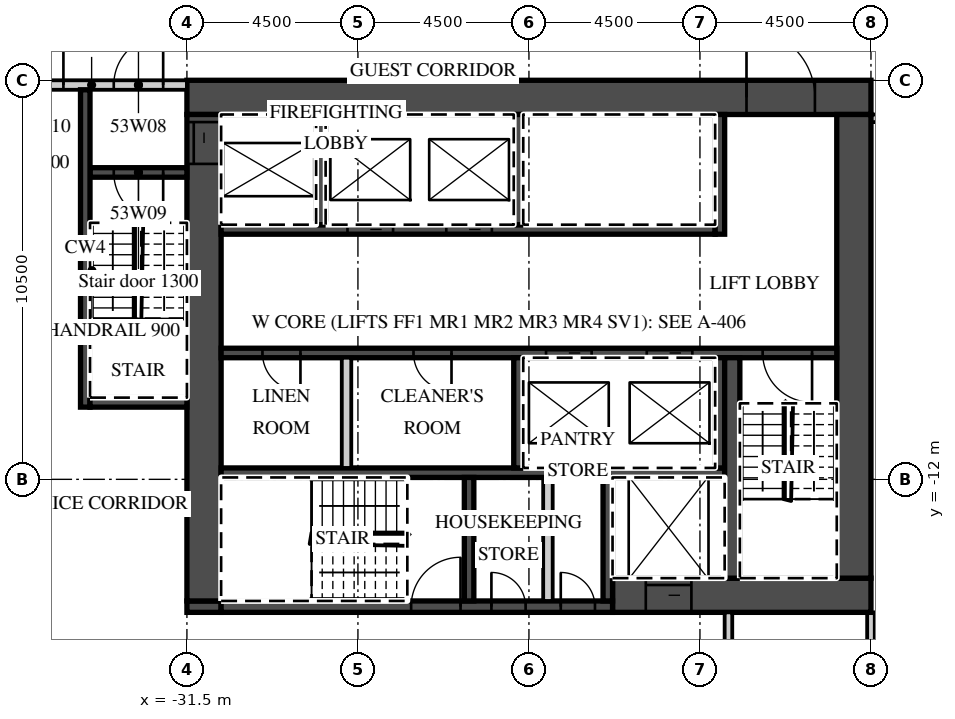
"""IFC4 building model, lengths in metres.
Left out: names, types, materials, properties, quantities, classifications, styles, units other than length and angle.
Written with IfcOpenShell. Run it as: python <this file> out.ifc"""

import sys

from ifc_helpers import new_model, si_unit, direction, frame, frame_2d, origin, place, context, subcontext, project, spatial, rectangle, extrude, element, fill, save


model = new_model("IFC4")
c1 = context("Model", 3, precision=1e-05, world=origin(), true_north=direction((0.0, 1.0)))
c2 = subcontext(c1, "Body", "Model", "MODEL_VIEW")
j1 = project(units=[si_unit("LENGTHUNIT", "METRE"), si_unit("PLANEANGLEUNIT", "RADIAN")], contexts=[c1])
p1 = place(None, origin())
s1 = spatial("IfcSite", under=j1, at=p1, CompositionType="ELEMENT")
p2 = place(p1, origin())
s2 = spatial("IfcBuilding", under=s1, at=p2, CompositionType="ELEMENT")
p3 = place(p2, frame((0.0, 0.0, 221.0)))
s3 = spatial("IfcBuildingStorey", under=s2, at=p3, CompositionType="ELEMENT", Elevation=221.0)
p4 = place(p3, frame((-13.5, -19.641, 0.0), z_axis=(0.0, 0.0, 1.0), x_axis=(0.0, 1.0, 0.0)))
e1 = element("IfcWall", 1, at=p4, inside=s3, PredefinedType="PARTITIONING", context=c2, shape_type="SweptSolid", body=[
    extrude(rectangle(XDim=4.141, YDim=0.2, at=frame_2d((2.071, 0.0))), origin(), (0.0, 0.0, 1.0), 3.02),
])
p5 = place(p3, frame((-13.5, -2.5, 0.0), z_axis=(0.0, 0.0, 1.0), x_axis=(1.0, 0.0, 0.0)))
e2 = element("IfcWall", 2, at=p5, inside=s3, PredefinedType="PARTITIONING", context=c2, shape_type="SweptSolid", body=[
    extrude(rectangle(XDim=27.0, YDim=0.2, at=frame_2d((13.5, 0.0))), origin(), (0.0, 0.0, 1.0), 3.02),
])
p6 = place(p5, frame((0.575, 0.0, 0.0)))
e3 = element("IfcOpeningElement", 3, at=p6, cuts=e2, PredefinedType="OPENING", context=c2, shape_type="SweptSolid", body=[
    extrude(rectangle(XDim=1.0, YDim=2.1, at=frame_2d((0.5, 1.05))), frame((0.0, 0.11, 0.0), z_axis=(0.0, -1.0, 0.0), x_axis=(1.0, 0.0, 0.0)), (0.0, 0.0, 1.0), 0.22),
])
p7 = place(p5, frame((6.938, 0.0, 0.0)))
e4 = element("IfcOpeningElement", 4, at=p7, cuts=e2, PredefinedType="OPENING", context=c2, shape_type="SweptSolid", body=[
    extrude(rectangle(XDim=1.2, YDim=2.1, at=frame_2d((0.6, 1.05))), frame((0.0, 0.11, 0.0), z_axis=(0.0, -1.0, 0.0), x_axis=(1.0, 0.0, 0.0)), (0.0, 0.0, 1.0), 0.22),
])
p8 = place(p5, frame((15.938, 0.0, 0.0)))
e5 = element("IfcOpeningElement", 5, at=p8, cuts=e2, PredefinedType="OPENING", context=c2, shape_type="SweptSolid", body=[
    extrude(rectangle(XDim=1.2, YDim=2.1, at=frame_2d((0.6, 1.05))), frame((0.0, 0.11, 0.0), z_axis=(0.0, -1.0, 0.0), x_axis=(1.0, 0.0, 0.0)), (0.0, 0.0, 1.0), 0.22),
])
p9 = place(p5, frame((25.425, 0.0, 0.0)))
e6 = element("IfcOpeningElement", 6, at=p9, cuts=e2, PredefinedType="OPENING", context=c2, shape_type="SweptSolid", body=[
    extrude(rectangle(XDim=1.0, YDim=2.1, at=frame_2d((0.5, 1.05))), frame((0.0, 0.11, 0.0), z_axis=(0.0, -1.0, 0.0), x_axis=(1.0, 0.0, 0.0)), (0.0, 0.0, 1.0), 0.22),
])
p10 = place(p3, frame((-31.5, -1.95, 0.0), z_axis=(0.0, 0.0, 1.0), x_axis=(1.0, 0.0, 0.0)))
e7 = element("IfcWall", 7, at=p10, inside=s3, PredefinedType="SHEAR", context=c2, shape_type="SweptSolid", body=[
    extrude(rectangle(XDim=18.0, YDim=0.9, at=frame_2d((9.0, 0.0))), origin(), (0.0, 0.0, 1.0), 3.02),
])
p11 = place(p10, frame((14.725, 0.0, 0.0)))
e8 = element("IfcOpeningElement", 8, at=p11, cuts=e7, PredefinedType="OPENING", context=c2, shape_type="SweptSolid", body=[
    extrude(rectangle(XDim=1.8, YDim=2.1, at=frame_2d((0.9, 1.05))), frame((0.0, 0.46, 0.0), z_axis=(0.0, -1.0, 0.0), x_axis=(1.0, 0.0, 0.0)), (0.0, 0.0, 1.0), 0.92),
])
p12 = place(p3, frame((-20.3, -15.05, 0.0), z_axis=(0.0, 0.0, 1.0), x_axis=(1.0, 0.0, 0.0)))
e9 = element("IfcWall", 9, at=p12, inside=s3, PredefinedType="SHEAR", context=c2, shape_type="SweptSolid", body=[
    extrude(rectangle(XDim=6.8, YDim=0.9, at=frame_2d((3.4, 0.0))), origin(), (0.0, 0.0, 1.0), 3.02),
])
p13 = place(p12, frame((0.875, 0.0, 0.0)))
e10 = element("IfcOpeningElement", 10, at=p13, cuts=e9, PredefinedType="OPENING", context=c2, shape_type="SweptSolid", body=[
    extrude(rectangle(XDim=1.2, YDim=2.1, at=frame_2d((0.6, 1.05))), frame((0.0, 0.46, 0.0), z_axis=(0.0, -1.0, 0.0), x_axis=(1.0, 0.0, 0.0)), (0.0, 0.0, 1.0), 0.92),
])
p14 = place(p3, frame((-31.5, -15.35, 0.0), z_axis=(0.0, 0.0, 1.0), x_axis=(1.0, 0.0, 0.0)))
e11 = element("IfcWall", 11, at=p14, inside=s3, PredefinedType="SHEAR", context=c2, shape_type="SweptSolid", body=[
    extrude(rectangle(XDim=0.9, YDim=0.3, at=frame_2d((0.45, 0.0))), origin(), (0.0, 0.0, 1.0), 3.02),
])
p15 = place(p3, frame((-30.6, -15.35, 0.0), z_axis=(0.0, 0.0, 1.0), x_axis=(1.0, 0.0, 0.0)))
e12 = element("IfcWall", 12, at=p15, inside=s3, PredefinedType="SHEAR", context=c2, shape_type="SweptSolid", body=[
    extrude(rectangle(XDim=10.3, YDim=0.3, at=frame_2d((5.15, 0.0))), origin(), (0.0, 0.0, 1.0), 3.02),
])
p16 = place(p15, frame((5.0, 0.0, 0.0)))
e13 = element("IfcOpeningElement", 13, at=p16, cuts=e12, PredefinedType="OPENING", context=c2, shape_type="SweptSolid", body=[
    extrude(rectangle(XDim=1.3, YDim=2.1, at=frame_2d((0.65, 1.05))), frame((0.0, 0.16, 0.0), z_axis=(0.0, -1.0, 0.0), x_axis=(1.0, 0.0, 0.0)), (0.0, 0.0, 1.0), 0.32),
])
p17 = place(p15, frame((7.113, 0.0, 0.0)))
e14 = element("IfcOpeningElement", 14, at=p17, cuts=e12, PredefinedType="OPENING", context=c2, shape_type="SweptSolid", body=[
    extrude(rectangle(XDim=0.9, YDim=2.1, at=frame_2d((0.45, 1.05))), frame((0.0, 0.16, 0.0), z_axis=(0.0, -1.0, 0.0), x_axis=(1.0, 0.0, 0.0)), (0.0, 0.0, 1.0), 0.32),
])
p18 = place(p15, frame((8.938, 0.0, 0.0)))
e15 = element("IfcOpeningElement", 15, at=p18, cuts=e12, PredefinedType="OPENING", context=c2, shape_type="SweptSolid", body=[
    extrude(rectangle(XDim=0.9, YDim=2.1, at=frame_2d((0.45, 1.05))), frame((0.0, 0.16, 0.0), z_axis=(0.0, -1.0, 0.0), x_axis=(1.0, 0.0, 0.0)), (0.0, 0.0, 1.0), 0.32),
])
p19 = place(p3, frame((-31.05, -15.2, 0.0), z_axis=(0.0, 0.0, 1.0), x_axis=(0.0, 1.0, 0.0)))
e16 = element("IfcWall", 16, at=p19, inside=s3, PredefinedType="SHEAR", context=c2, shape_type="SweptSolid", body=[
    extrude(rectangle(XDim=12.8, YDim=0.9, at=frame_2d((6.4, 0.0))), origin(), (0.0, 0.0, 1.0), 3.02),
])
p20 = place(p19, frame((11.5, 0.0, 0.0)))
e17 = element("IfcOpeningElement", 17, at=p20, cuts=e16, PredefinedType="OPENING", context=c2, shape_type="SweptSolid", body=[
    extrude(rectangle(XDim=1.1, YDim=2.1, at=frame_2d((0.55, 1.05))), frame((0.0, 0.46, 0.0), z_axis=(0.0, -1.0, 0.0), x_axis=(1.0, 0.0, 0.0)), (0.0, 0.0, 1.0), 0.92),
])
p21 = place(p3, frame((-13.95, -14.6, 0.0), z_axis=(0.0, 0.0, 1.0), x_axis=(0.0, 1.0, 0.0)))
e18 = element("IfcWall", 18, at=p21, inside=s3, PredefinedType="SHEAR", context=c2, shape_type="SweptSolid", body=[
    extrude(rectangle(XDim=12.2, YDim=0.9, at=frame_2d((6.1, 0.0))), origin(), (0.0, 0.0, 1.0), 3.02),
])
p22 = place(p3, frame((-30.6, -5.425, 0.0), z_axis=(0.0, 0.0, 1.0), x_axis=(1.0, 0.0, 0.0)))
e19 = element("IfcWall", 19, at=p22, inside=s3, PredefinedType="SHEAR", context=c2, shape_type="SweptSolid", body=[
    extrude(rectangle(XDim=13.0, YDim=0.25, at=frame_2d((6.5, 0.0))), origin(), (0.0, 0.0, 1.0), 3.02),
])
p23 = place(p22, frame((3.325, 0.0, 0.0)))
e20 = element("IfcOpeningElement", 20, at=p23, cuts=e19, PredefinedType="OPENING", context=c2, shape_type="SweptSolid", body=[
    extrude(rectangle(XDim=1.2, YDim=2.1, at=frame_2d((0.6, 1.05))), frame((0.0, 0.135, 0.0), z_axis=(0.0, -1.0, 0.0), x_axis=(1.0, 0.0, 0.0)), (0.0, 0.0, 1.0), 0.27),
])
p24 = place(p22, frame((5.925, 0.0, 0.0)))
e21 = element("IfcOpeningElement", 21, at=p24, cuts=e19, PredefinedType="OPENING", context=c2, shape_type="SweptSolid", body=[
    extrude(rectangle(XDim=1.2, YDim=2.1, at=frame_2d((0.6, 1.05))), frame((0.0, 0.135, 0.0), z_axis=(0.0, -1.0, 0.0), x_axis=(1.0, 0.0, 0.0)), (0.0, 0.0, 1.0), 0.27),
])
p25 = place(p3, frame((-17.475, -5.55, 0.0), z_axis=(0.0, 0.0, 1.0), x_axis=(0.0, 1.0, 0.0)))
e22 = element("IfcWall", 22, at=p25, inside=s3, PredefinedType="SHEAR", context=c2, shape_type="SweptSolid", body=[
    extrude(rectangle(XDim=3.15, YDim=0.25, at=frame_2d((1.575, 0.0))), origin(), (0.0, 0.0, 1.0), 3.02),
])
for number, where, z_axis, x_axis in (
    (23, (-27.975, -5.3, 0.0), (0.0, 0.0, 1.0), (0.0, 1.0, 0.0)),
    (24, (-22.775, -5.3, 0.0), (0.0, 0.0, 1.0), (0.0, 1.0, 0.0)),
):
    element("IfcWall", number, at=place(p3, frame(where, z_axis=z_axis, x_axis=x_axis)), inside=s3, PredefinedType="SHEAR", context=c2, shape_type="SweptSolid", body=[
        extrude(rectangle(XDim=2.9, YDim=0.25, at=frame_2d((1.45, 0.0))), origin(), (0.0, 0.0, 1.0), 3.02),
    ])
p26 = place(p3, frame((-30.6, -8.675, 0.0), z_axis=(0.0, 0.0, 1.0), x_axis=(1.0, 0.0, 0.0)))
e25 = element("IfcWall", 25, at=p26, inside=s3, PredefinedType="SHEAR", context=c2, shape_type="SweptSolid", body=[
    extrude(rectangle(XDim=16.2, YDim=0.25, at=frame_2d((8.1, 0.0))), origin(), (0.0, 0.0, 1.0), 3.02),
])
p27 = place(p26, frame((8.55, 0.0, 0.0)))
e26 = element("IfcOpeningElement", 26, at=p27, cuts=e25, PredefinedType="OPENING", context=c2, shape_type="SweptSolid", body=[
    extrude(rectangle(XDim=1.2, YDim=2.1, at=frame_2d((0.6, 1.05))), frame((0.0, 0.135, 0.0), z_axis=(0.0, -1.0, 0.0), x_axis=(1.0, 0.0, 0.0)), (0.0, 0.0, 1.0), 0.27),
])
p28 = place(p26, frame((11.2, 0.0, 0.0)))
e27 = element("IfcOpeningElement", 27, at=p28, cuts=e25, PredefinedType="OPENING", context=c2, shape_type="SweptSolid", body=[
    extrude(rectangle(XDim=1.2, YDim=2.1, at=frame_2d((0.6, 1.05))), frame((0.0, 0.135, 0.0), z_axis=(0.0, -1.0, 0.0), x_axis=(1.0, 0.0, 0.0)), (0.0, 0.0, 1.0), 0.27),
])
p29 = place(p26, frame((14.25, 0.0, 0.0)))
e28 = element("IfcOpeningElement", 28, at=p29, cuts=e25, PredefinedType="OPENING", context=c2, shape_type="SweptSolid", body=[
    extrude(rectangle(XDim=1.3, YDim=2.1, at=frame_2d((0.65, 1.05))), frame((0.0, 0.135, 0.0), z_axis=(0.0, -1.0, 0.0), x_axis=(1.0, 0.0, 0.0)), (0.0, 0.0, 1.0), 0.27),
])
p30 = place(p26, frame((1.087, 0.0, 0.0)))
e29 = element("IfcOpeningElement", 29, at=p30, cuts=e25, PredefinedType="OPENING", context=c2, shape_type="SweptSolid", body=[
    extrude(rectangle(XDim=1.0, YDim=2.1, at=frame_2d((0.5, 1.05))), frame((0.0, 0.135, 0.0), z_axis=(0.0, -1.0, 0.0), x_axis=(1.0, 0.0, 0.0)), (0.0, 0.0, 1.0), 0.27),
])
p31 = place(p26, frame((5.062, 0.0, 0.0)))
e30 = element("IfcOpeningElement", 30, at=p31, cuts=e25, PredefinedType="OPENING", context=c2, shape_type="SweptSolid", body=[
    extrude(rectangle(XDim=1.0, YDim=2.1, at=frame_2d((0.5, 1.05))), frame((0.0, 0.135, 0.0), z_axis=(0.0, -1.0, 0.0), x_axis=(1.0, 0.0, 0.0)), (0.0, 0.0, 1.0), 0.27),
])
p32 = place(p3, frame((-30.6, -11.825, 0.0), z_axis=(0.0, 0.0, 1.0), x_axis=(1.0, 0.0, 0.0)))
e31 = element("IfcWall", 31, at=p32, inside=s3, PredefinedType="SHEAR", context=c2, shape_type="SweptSolid", body=[
    extrude(rectangle(XDim=13.25, YDim=0.25, at=frame_2d((6.625, 0.0))), origin(), (0.0, 0.0, 1.0), 3.02),
])
for number, where, z_axis, x_axis in (
    (32, (-17.475, -11.7, 0.0), (0.0, 0.0, 1.0), (0.0, 1.0, 0.0)),
    (33, (-22.775, -11.7, 0.0), (0.0, 0.0, 1.0), (0.0, 1.0, 0.0)),
):
    element("IfcWall", number, at=place(p3, frame(where, z_axis=z_axis, x_axis=x_axis)), inside=s3, PredefinedType="SHEAR", context=c2, shape_type="SweptSolid", body=[
        extrude(rectangle(XDim=2.9, YDim=0.25, at=frame_2d((1.45, 0.0))), origin(), (0.0, 0.0, 1.0), 3.02),
    ])
p33 = place(p3, frame((-27.3, -11.7, 0.0), z_axis=(0.0, 0.0, 1.0), x_axis=(0.0, 1.0, 0.0)))
e34 = element("IfcWall", 34, at=p33, inside=s3, PredefinedType="PARTITIONING", context=c2, shape_type="SweptSolid", body=[
    extrude(rectangle(XDim=2.9, YDim=0.25, at=frame_2d((1.45, 0.0))), origin(), (0.0, 0.0, 1.0), 3.02),
])
p34 = place(p3, frame((-17.15, -14.6, 0.0), z_axis=(0.0, 0.0, 1.0), x_axis=(0.0, 1.0, 0.0)))
e35 = element("IfcWall", 35, at=p34, inside=s3, PredefinedType="SHEAR", context=c2, shape_type="SweptSolid", body=[
    extrude(rectangle(XDim=5.8, YDim=0.4, at=frame_2d((2.9, 0.0))), origin(), (0.0, 0.0, 1.0), 3.02),
])
for number, where, z_axis, x_axis in (
    (36, (-20.425, -15.2, 0.0), (0.0, 0.0, 1.0), (0.0, 1.0, 0.0)),
    (37, (-24.075, -15.2, 0.0), (0.0, 0.0, 1.0), (0.0, 1.0, 0.0)),
):
    element("IfcWall", number, at=place(p3, frame(where, z_axis=z_axis, x_axis=x_axis)), inside=s3, PredefinedType="SHEAR", context=c2, shape_type="SweptSolid", body=[
        extrude(rectangle(XDim=3.25, YDim=0.25, at=frame_2d((1.625, 0.0))), origin(), (0.0, 0.0, 1.0), 3.02),
    ])
p35 = place(p3, frame((-22.0, -15.2, 0.0), z_axis=(0.0, 0.0, 1.0), x_axis=(0.0, 1.0, 0.0)))
e38 = element("IfcWall", 38, at=p35, inside=s3, PredefinedType="PARTITIONING", context=c2, shape_type="SweptSolid", body=[
    extrude(rectangle(XDim=3.25, YDim=0.25, at=frame_2d((1.625, 0.0))), origin(), (0.0, 0.0, 1.0), 3.02),
])
p36 = place(p3, frame((-36.515, -1.625, 0.0), z_axis=(0.0, 0.0, 1.0), x_axis=(1.0, 0.0, 0.0)))
e39 = element("IfcWall", 39, at=p36, inside=s3, PredefinedType="PARTITIONING", context=c2, shape_type="SweptSolid", body=[
    extrude(rectangle(XDim=5.015, YDim=0.25, at=frame_2d((2.508, 0.0))), origin(), (0.0, 0.0, 1.0), 3.02),
])
p37 = place(p36, frame((3.09, 0.0, 0.0)))
e40 = element("IfcOpeningElement", 40, at=p37, cuts=e39, PredefinedType="OPENING", context=c2, shape_type="SweptSolid", body=[
    extrude(rectangle(XDim=1.3, YDim=2.1, at=frame_2d((0.65, 1.05))), frame((0.0, 0.135, 0.0), z_axis=(0.0, -1.0, 0.0), x_axis=(1.0, 0.0, 0.0)), (0.0, 0.0, 1.0), 0.27),
])
p38 = place(p36, frame((0.665, 0.0, 0.0)))
e41 = element("IfcOpeningElement", 41, at=p38, cuts=e39, PredefinedType="OPENING", context=c2, shape_type="SweptSolid", body=[
    extrude(rectangle(XDim=1.1, YDim=2.1, at=frame_2d((0.55, 1.05))), frame((0.0, 0.135, 0.0), z_axis=(0.0, -1.0, 0.0), x_axis=(1.0, 0.0, 0.0)), (0.0, 0.0, 1.0), 0.27),
])
p39 = place(p3, frame((-34.05, -3.925, 0.0), z_axis=(0.0, 0.0, 1.0), x_axis=(1.0, 0.0, 0.0)))
e42 = element("IfcWall", 42, at=p39, inside=s3, PredefinedType="SHEAR", context=c2, shape_type="SweptSolid", body=[
    extrude(rectangle(XDim=2.55, YDim=0.25, at=frame_2d((1.275, 0.0))), origin(), (0.0, 0.0, 1.0), 3.02),
])
p40 = place(p39, frame((0.625, 0.0, 0.0)))
e43 = element("IfcOpeningElement", 43, at=p40, cuts=e42, PredefinedType="OPENING", context=c2, shape_type="SweptSolid", body=[
    extrude(rectangle(XDim=1.3, YDim=2.1, at=frame_2d((0.65, 1.05))), frame((0.0, 0.135, 0.0), z_axis=(0.0, -1.0, 0.0), x_axis=(1.0, 0.0, 0.0)), (0.0, 0.0, 1.0), 0.27),
])
p41 = place(p3, frame((-34.175, -10.1, 0.0), z_axis=(0.0, 0.0, 1.0), x_axis=(0.0, 1.0, 0.0)))
e44 = element("IfcWall", 44, at=p41, inside=s3, PredefinedType="SHEAR", context=c2, shape_type="SweptSolid", body=[
    extrude(rectangle(XDim=8.35, YDim=0.25, at=frame_2d((4.175, 0.0))), origin(), (0.0, 0.0, 1.0), 3.02),
])
p42 = place(p3, frame((-34.05, -9.975, 0.0), z_axis=(0.0, 0.0, 1.0), x_axis=(1.0, 0.0, 0.0)))
e45 = element("IfcWall", 45, at=p42, inside=s3, PredefinedType="SHEAR", context=c2, shape_type="SweptSolid", body=[
    extrude(rectangle(XDim=2.55, YDim=0.25, at=frame_2d((1.275, 0.0))), origin(), (0.0, 0.0, 1.0), 3.02),
])
p43 = place(p3, frame((-17.25, -17.7, 0.0), z_axis=(0.0, 0.0, 1.0), x_axis=(0.0, 1.0, 0.0)))
e46 = element("IfcWall", 46, at=p43, inside=s3, PredefinedType="PARTITIONING", context=c2, shape_type="SweptSolid", body=[
    extrude(rectangle(XDim=2.2, YDim=0.2, at=frame_2d((1.1, 0.0))), origin(), (0.0, 0.0, 1.0), 3.02),
])
p44 = place(p27, origin())
e47 = element("IfcDoor", 47, at=p44, inside=s3, OperationType="SLIDING_TO_LEFT", PredefinedType="DOOR", context=c2, shape_type="SweptSolid", body=[
    extrude(rectangle(XDim=1.2, YDim=2.1, at=frame_2d((0.6, 1.05))), frame((0.0, 0.025, 0.0), z_axis=(0.0, -1.0, 0.0), x_axis=(1.0, 0.0, 0.0)), (0.0, 0.0, 1.0), 0.05),
])
fill(e26, e47)
p45 = place(p28, origin())
e48 = element("IfcDoor", 48, at=p45, inside=s3, OperationType="SLIDING_TO_RIGHT", PredefinedType="DOOR", context=c2, shape_type="SweptSolid", body=[
    extrude(rectangle(XDim=1.2, YDim=2.1, at=frame_2d((0.6, 1.05))), frame((0.0, 0.025, 0.0), z_axis=(0.0, -1.0, 0.0), x_axis=(1.0, 0.0, 0.0)), (0.0, 0.0, 1.0), 0.05),
])
fill(e27, e48)
p46 = place(p23, origin())
e49 = element("IfcDoor", 49, at=p46, inside=s3, OperationType="SLIDING_TO_RIGHT", PredefinedType="DOOR", context=c2, shape_type="SweptSolid", body=[
    extrude(rectangle(XDim=1.2, YDim=2.1, at=frame_2d((0.6, 1.05))), frame((0.0, 0.025, 0.0), z_axis=(0.0, -1.0, 0.0), x_axis=(1.0, 0.0, 0.0)), (0.0, 0.0, 1.0), 0.05),
])
fill(e20, e49)
p47 = place(p24, origin())
e50 = element("IfcDoor", 50, at=p47, inside=s3, OperationType="SLIDING_TO_RIGHT", PredefinedType="DOOR", context=c2, shape_type="SweptSolid", body=[
    extrude(rectangle(XDim=1.2, YDim=2.1, at=frame_2d((0.6, 1.05))), frame((0.0, 0.025, 0.0), z_axis=(0.0, -1.0, 0.0), x_axis=(1.0, 0.0, 0.0)), (0.0, 0.0, 1.0), 0.05),
])
fill(e21, e50)
p48 = place(p13, origin())
e51 = element("IfcDoor", 51, at=p48, inside=s3, OperationType="SLIDING_TO_LEFT", PredefinedType="DOOR", context=c2, shape_type="SweptSolid", body=[
    extrude(rectangle(XDim=1.2, YDim=2.1, at=frame_2d((0.6, 1.05))), frame((0.0, 0.025, 0.0), z_axis=(0.0, -1.0, 0.0), x_axis=(1.0, 0.0, 0.0)), (0.0, 0.0, 1.0), 0.05),
])
fill(e10, e51)
p49 = place(p20, origin())
e52 = element("IfcDoor", 52, at=p49, inside=s3, OperationType="SLIDING_TO_RIGHT", PredefinedType="DOOR", context=c2, shape_type="SweptSolid", body=[
    extrude(rectangle(XDim=1.1, YDim=2.1, at=frame_2d((0.55, 1.05))), frame((0.0, 0.025, 0.0), z_axis=(0.0, -1.0, 0.0), x_axis=(1.0, 0.0, 0.0)), (0.0, 0.0, 1.0), 0.05),
])
fill(e17, e52)
p50 = place(p11, origin())
e53 = element("IfcDoor", 53, at=p50, inside=s3, OperationType="DOUBLE_DOOR_DOUBLE_SWING", PredefinedType="DOOR", context=c2, shape_type="SweptSolid", body=[
    extrude(rectangle(XDim=1.8, YDim=2.1, at=frame_2d((0.9, 1.05))), frame((0.0, 0.025, 0.0), z_axis=(0.0, -1.0, 0.0), x_axis=(1.0, 0.0, 0.0)), (0.0, 0.0, 1.0), 0.05),
])
fill(e8, e53)
p51 = place(p37, origin())
e54 = element("IfcDoor", 54, at=p51, inside=s3, OperationType="SINGLE_SWING_RIGHT", PredefinedType="DOOR", context=c2, shape_type="SweptSolid", body=[
    extrude(rectangle(XDim=1.3, YDim=2.1, at=frame_2d((0.65, 1.05))), frame((0.0, 0.025, 0.0), z_axis=(0.0, -1.0, 0.0), x_axis=(1.0, 0.0, 0.0)), (0.0, 0.0, 1.0), 0.05),
])
fill(e40, e54)
p52 = place(p40, origin())
e55 = element("IfcDoor", 55, at=p52, inside=s3, OperationType="SINGLE_SWING_RIGHT", PredefinedType="DOOR", context=c2, shape_type="SweptSolid", body=[
    extrude(rectangle(XDim=1.3, YDim=2.1, at=frame_2d((0.65, 1.05))), frame((0.0, 0.025, 0.0), z_axis=(0.0, -1.0, 0.0), x_axis=(1.0, 0.0, 0.0)), (0.0, 0.0, 1.0), 0.05),
])
fill(e43, e55)
p53 = place(p38, origin())
e56 = element("IfcDoor", 56, at=p53, inside=s3, OperationType="SINGLE_SWING_RIGHT", PredefinedType="DOOR", context=c2, shape_type="SweptSolid", body=[
    extrude(rectangle(XDim=1.1, YDim=2.1, at=frame_2d((0.55, 1.05))), frame((0.0, 0.025, 0.0), z_axis=(0.0, -1.0, 0.0), x_axis=(1.0, 0.0, 0.0)), (0.0, 0.0, 1.0), 0.05),
])
fill(e41, e56)
p54 = place(p29, origin())
e57 = element("IfcDoor", 57, at=p54, inside=s3, OperationType="SINGLE_SWING_RIGHT", PredefinedType="DOOR", context=c2, shape_type="SweptSolid", body=[
    extrude(rectangle(XDim=1.3, YDim=2.1, at=frame_2d((0.65, 1.05))), frame((0.0, 0.025, 0.0), z_axis=(0.0, -1.0, 0.0), x_axis=(1.0, 0.0, 0.0)), (0.0, 0.0, 1.0), 0.05),
])
fill(e28, e57)
p55 = place(p16, origin())
e58 = element("IfcDoor", 58, at=p55, inside=s3, OperationType="SINGLE_SWING_RIGHT", PredefinedType="DOOR", context=c2, shape_type="SweptSolid", body=[
    extrude(rectangle(XDim=1.3, YDim=2.1, at=frame_2d((0.65, 1.05))), frame((0.0, 0.025, 0.0), z_axis=(0.0, -1.0, 0.0), x_axis=(1.0, 0.0, 0.0)), (0.0, 0.0, 1.0), 0.05),
])
fill(e13, e58)
p56 = place(p17, origin())
e59 = element("IfcDoor", 59, at=p56, inside=s3, OperationType="SINGLE_SWING_LEFT", PredefinedType="DOOR", context=c2, shape_type="SweptSolid", body=[
    extrude(rectangle(XDim=0.9, YDim=2.1, at=frame_2d((0.45, 1.05))), frame((0.0, 0.025, 0.0), z_axis=(0.0, -1.0, 0.0), x_axis=(1.0, 0.0, 0.0)), (0.0, 0.0, 1.0), 0.05),
])
fill(e14, e59)
p57 = place(p18, origin())
e60 = element("IfcDoor", 60, at=p57, inside=s3, OperationType="SINGLE_SWING_LEFT", PredefinedType="DOOR", context=c2, shape_type="SweptSolid", body=[
    extrude(rectangle(XDim=0.9, YDim=2.1, at=frame_2d((0.45, 1.05))), frame((0.0, 0.025, 0.0), z_axis=(0.0, -1.0, 0.0), x_axis=(1.0, 0.0, 0.0)), (0.0, 0.0, 1.0), 0.05),
])
fill(e15, e60)
p58 = place(p30, origin())
e61 = element("IfcDoor", 61, at=p58, inside=s3, OperationType="SINGLE_SWING_RIGHT", PredefinedType="DOOR", context=c2, shape_type="SweptSolid", body=[
    extrude(rectangle(XDim=1.0, YDim=2.1, at=frame_2d((0.5, 1.05))), frame((0.0, 0.025, 0.0), z_axis=(0.0, -1.0, 0.0), x_axis=(1.0, 0.0, 0.0)), (0.0, 0.0, 1.0), 0.05),
])
fill(e29, e61)
p59 = place(p31, origin())
e62 = element("IfcDoor", 62, at=p59, inside=s3, OperationType="SINGLE_SWING_RIGHT", PredefinedType="DOOR", context=c2, shape_type="SweptSolid", body=[
    extrude(rectangle(XDim=1.0, YDim=2.1, at=frame_2d((0.5, 1.05))), frame((0.0, 0.025, 0.0), z_axis=(0.0, -1.0, 0.0), x_axis=(1.0, 0.0, 0.0)), (0.0, 0.0, 1.0), 0.05),
])
fill(e30, e62)
save(model, sys.argv[1])
